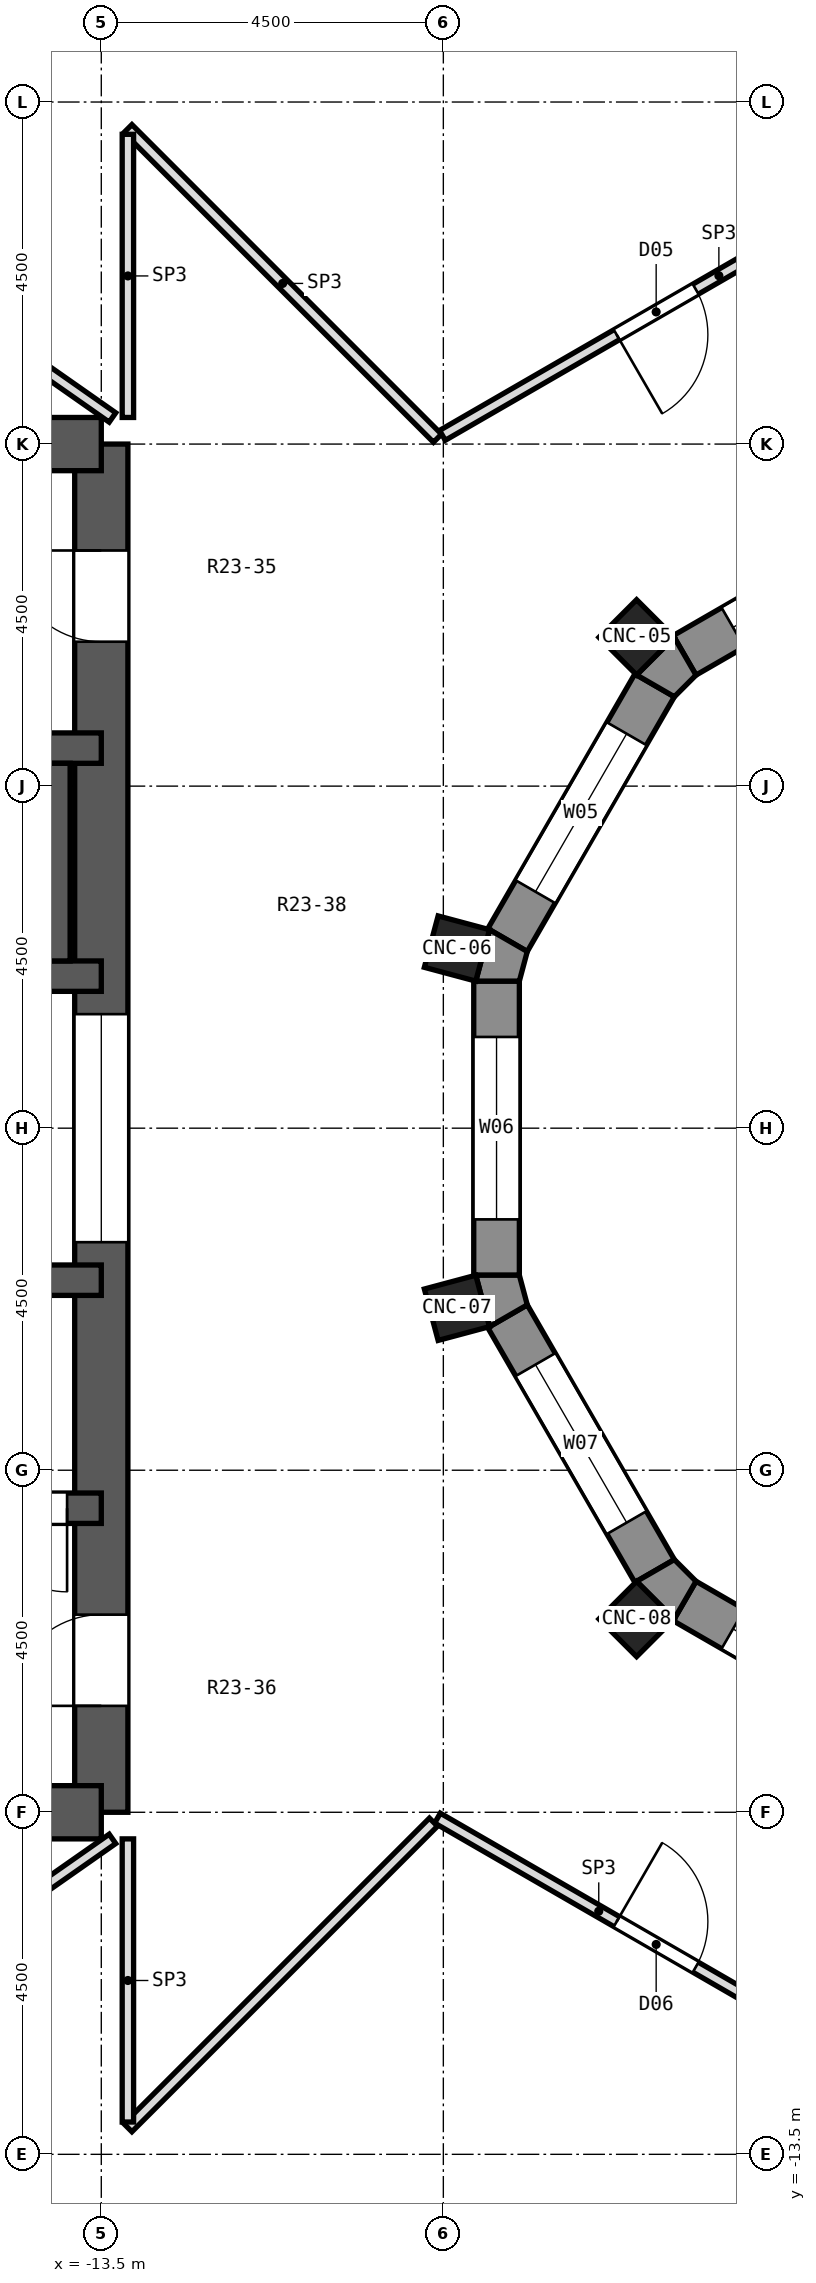
"""IFC4 building model, lengths in metres.
Left out: names, types, materials, properties, quantities, classifications, styles, units other than length and angle.
Written with IfcOpenShell. Run it as: python <this file> out.ifc"""

import sys

from ifc_helpers import new_model, si_unit, direction, frame, frame_2d, origin, origin_2d, place, context, subcontext, project, spatial, polyline, rectangle, outline, extrude, element, fill, save


model = new_model("IFC4")
c1 = context("Model", 3, precision=1e-05, world=origin(), true_north=direction((0.0, 1.0)))
c2 = subcontext(c1, "Body", "Model", "MODEL_VIEW")
j1 = project(units=[si_unit("LENGTHUNIT", "METRE"), si_unit("PLANEANGLEUNIT", "RADIAN")], contexts=[c1])
p1 = place(None, origin())
s1 = spatial("IfcSite", under=j1, at=p1, CompositionType="ELEMENT")
p2 = place(p1, origin())
s2 = spatial("IfcBuilding", under=s1, at=p2, CompositionType="ELEMENT")
p3 = place(p2, frame((0.0, 0.0, 151.3)))
s3 = spatial("IfcBuildingStorey", under=s2, at=p3, CompositionType="ELEMENT", Elevation=151.3)
for number, where, z_axis, x_axis in (
    (1, (-6.458, 6.458, 0.0), (0.0, 0.0, 1.0), (-0.707, 0.707, 0.0)),
    (2, (-8.821, 2.364, 0.0), (0.0, 0.0, 1.0), (-0.966, 0.259, 0.0)),
    (3, (-8.821, -2.364, 0.0), (0.0, 0.0, 1.0), (-0.966, -0.259, 0.0)),
    (4, (-6.458, -6.458, 0.0), (0.0, 0.0, 1.0), (-0.707, -0.707, 0.0)),
):
    element("IfcColumn", number, at=place(p3, frame(where, z_axis=z_axis, x_axis=x_axis)), inside=s3, PredefinedType="COLUMN", context=c2, shape_type="SweptSolid", body=[
        extrude(rectangle(XDim=0.7, YDim=0.7, at=origin_2d()), origin(), (0.0, 0.0, 1.0), 4.5),
    ])
p4 = place(p3, frame((-13.5, -9.0, 0.0), z_axis=(0.0, 0.0, 1.0), x_axis=(0.0, 1.0, 0.0)))
e5 = element("IfcWall", 5, at=p4, inside=s3, PredefinedType="SHEAR", context=c2, shape_type="SweptSolid", body=[
    extrude(rectangle(XDim=18.0, YDim=0.7, at=frame_2d((9.0, 0.0))), origin(), (0.0, 0.0, 1.0), 4.5),
])
p5 = place(p4, frame((15.4, 0.0, 0.0)))
e6 = element("IfcOpeningElement", 6, at=p5, cuts=e5, PredefinedType="OPENING", context=c2, shape_type="SweptSolid", body=[
    extrude(rectangle(XDim=1.2, YDim=2.1, at=frame_2d((0.6, 1.05))), frame((0.0, 0.362, 0.0), z_axis=(0.0, -1.0, 0.0), x_axis=(1.0, 0.0, 0.0)), (0.0, 0.0, 1.0), 0.724),
])
p6 = place(p4, frame((1.4, 0.0, 0.0)))
e7 = element("IfcOpeningElement", 7, at=p6, cuts=e5, PredefinedType="OPENING", context=c2, shape_type="SweptSolid", body=[
    extrude(rectangle(XDim=1.2, YDim=2.1, at=frame_2d((0.6, 1.05))), frame((0.0, 0.362, 0.0), z_axis=(0.0, -1.0, 0.0), x_axis=(1.0, 0.0, 0.0)), (0.0, 0.0, 1.0), 0.724),
])
p7 = place(p4, frame((7.5, 0.0, 0.0)))
e8 = element("IfcOpeningElement", 8, at=p7, cuts=e5, PredefinedType="OPENING", context=c2, shape_type="SweptSolid", body=[
    extrude(rectangle(XDim=3.0, YDim=2.4, at=frame_2d((1.5, 1.2))), frame((0.0, 0.362, 0.0), z_axis=(0.0, -1.0, 0.0), x_axis=(1.0, 0.0, 0.0)), (0.0, 0.0, 1.0), 0.724),
])
for number, where, z_axis, x_axis in (
    (9, (-13.5, 9.0, 0.0), (0.0, 0.0, 1.0), (-1.0, 0.0, 0.0)),
    (10, (-13.5, -9.0, 0.0), (0.0, 0.0, 1.0), (-1.0, 0.0, 0.0)),
):
    element("IfcWall", number, at=place(p3, frame(where, z_axis=z_axis, x_axis=x_axis)), inside=s3, PredefinedType="SHEAR", context=c2, shape_type="SweptSolid", body=[
        extrude(rectangle(XDim=8.0, YDim=0.7, at=frame_2d((4.0, 0.0))), origin(), (0.0, 0.0, 1.0), 4.5),
    ])
p8 = place(p3, frame((-13.5, 5.0, 0.0), z_axis=(0.0, 0.0, 1.0), x_axis=(-1.0, 0.0, 0.0)))
e11 = element("IfcWall", 11, at=p8, inside=s3, PredefinedType="SHEAR", context=c2, shape_type="SweptSolid", body=[
    extrude(rectangle(XDim=8.0, YDim=0.4, at=frame_2d((4.0, 0.0))), origin(), (0.0, 0.0, 1.0), 4.5),
])
p9 = place(p3, frame((-13.5, -5.0, 0.0), z_axis=(0.0, 0.0, 1.0), x_axis=(-1.0, 0.0, 0.0)))
e12 = element("IfcWall", 12, at=p9, inside=s3, PredefinedType="SHEAR", context=c2, shape_type="SweptSolid", body=[
    extrude(rectangle(XDim=8.0, YDim=0.4, at=frame_2d((4.0, 0.0))), origin(), (0.0, 0.0, 1.0), 4.5),
])
p10 = place(p9, frame((0.45, 0.0, 0.0)))
e13 = element("IfcOpeningElement", 13, at=p10, cuts=e12, PredefinedType="OPENING", context=c2, shape_type="SweptSolid", body=[
    extrude(rectangle(XDim=1.1, YDim=2.1, at=frame_2d((0.55, 1.05))), frame((0.0, 0.212, 0.0), z_axis=(0.0, -1.0, 0.0), x_axis=(1.0, 0.0, 0.0)), (0.0, 0.0, 1.0), 0.424),
])
p11 = place(p3, frame((-13.5, 2.0, 0.0), z_axis=(0.0, 0.0, 1.0), x_axis=(-1.0, 0.0, 0.0)))
e14 = element("IfcWall", 14, at=p11, inside=s3, PredefinedType="SHEAR", context=c2, shape_type="SweptSolid", body=[
    extrude(rectangle(XDim=8.0, YDim=0.4, at=frame_2d((4.0, 0.0))), origin(), (0.0, 0.0, 1.0), 4.5),
])
p12 = place(p11, frame((5.37, 0.0, 0.0)))
e15 = element("IfcOpeningElement", 15, at=p12, cuts=e14, PredefinedType="OPENING", context=c2, shape_type="SweptSolid", body=[
    extrude(rectangle(XDim=1.1, YDim=2.1, at=frame_2d((0.55, 1.05))), frame((0.0, 0.212, 0.0), z_axis=(0.0, -1.0, 0.0), x_axis=(1.0, 0.0, 0.0)), (0.0, 0.0, 1.0), 0.424),
])
p13 = place(p3, frame((-13.5, -2.0, 0.0), z_axis=(0.0, 0.0, 1.0), x_axis=(-1.0, 0.0, 0.0)))
e16 = element("IfcWall", 16, at=p13, inside=s3, PredefinedType="SHEAR", context=c2, shape_type="SweptSolid", body=[
    extrude(rectangle(XDim=8.0, YDim=0.4, at=frame_2d((4.0, 0.0))), origin(), (0.0, 0.0, 1.0), 4.5),
])
p14 = place(p13, frame((1.19, 0.0, 0.0)))
e17 = element("IfcOpeningElement", 17, at=p14, cuts=e16, PredefinedType="OPENING", context=c2, shape_type="SweptSolid", body=[
    extrude(rectangle(XDim=1.0, YDim=2.1, at=frame_2d((0.5, 1.05))), frame((0.0, 0.212, 0.0), z_axis=(0.0, -1.0, 0.0), x_axis=(1.0, 0.0, 0.0)), (0.0, 0.0, 1.0), 0.424),
])
p15 = place(p13, frame((5.445, 0.0, 0.0)))
e18 = element("IfcOpeningElement", 18, at=p15, cuts=e16, PredefinedType="OPENING", context=c2, shape_type="SweptSolid", body=[
    extrude(rectangle(XDim=0.9, YDim=2.1, at=frame_2d((0.45, 1.05))), frame((0.0, 0.212, 0.0), z_axis=(0.0, -1.0, 0.0), x_axis=(1.0, 0.0, 0.0)), (0.0, 0.0, 1.0), 0.424),
])
p16 = place(p13, frame((6.615, 0.0, 0.0)))
e19 = element("IfcOpeningElement", 19, at=p16, cuts=e16, PredefinedType="OPENING", context=c2, shape_type="SweptSolid", body=[
    extrude(rectangle(XDim=0.9, YDim=2.1, at=frame_2d((0.45, 1.05))), frame((0.0, 0.212, 0.0), z_axis=(0.0, -1.0, 0.0), x_axis=(1.0, 0.0, 0.0)), (0.0, 0.0, 1.0), 0.424),
])
p17 = place(p3, frame((-2.474, 8.156, 0.0), z_axis=(0.0, 0.0, 1.0), x_axis=(-0.866005929495, -0.500033728941, 0.0)))
e20 = element("IfcWall", 20, at=p17, inside=s3, PredefinedType="SOLIDWALL", context=c2, shape_type="SweptSolid", body=[
    extrude(rectangle(XDim=3.87, YDim=0.6, at=frame_2d((1.935, 0.0))), origin(), (0.0, 0.0, 1.0), 3.95),
])
p18 = place(p17, frame((0.735, 0.0, 1.5)))
e21 = element("IfcOpeningElement", 21, at=p18, cuts=e20, PredefinedType="OPENING", context=c2, shape_type="SweptSolid", body=[
    extrude(rectangle(XDim=2.4, YDim=2.0, at=frame_2d((1.2, 1.0))), frame((0.0, 0.312, 0.0), z_axis=(0.0, -1.0, 0.0), x_axis=(1.0, 0.0, 0.0)), (0.0, 0.0, 1.0), 0.624),
])
p19 = place(p3, frame((-6.22, 5.826, 0.0), z_axis=(0.0, 0.0, 1.0), x_axis=(-0.500033728941, -0.866005929495, 0.0)))
e22 = element("IfcWall", 22, at=p19, inside=s3, PredefinedType="SOLIDWALL", context=c2, shape_type="SweptSolid", body=[
    extrude(rectangle(XDim=3.87, YDim=0.6, at=frame_2d((1.935, 0.0))), origin(), (0.0, 0.0, 1.0), 3.95),
])
p20 = place(p19, frame((0.735, 0.0, 1.5)))
e23 = element("IfcOpeningElement", 23, at=p20, cuts=e22, PredefinedType="OPENING", context=c2, shape_type="SweptSolid", body=[
    extrude(rectangle(XDim=2.4, YDim=2.0, at=frame_2d((1.2, 1.0))), frame((0.0, 0.312, 0.0), z_axis=(0.0, -1.0, 0.0), x_axis=(1.0, 0.0, 0.0)), (0.0, 0.0, 1.0), 0.624),
])
p21 = place(p3, frame((-8.3, 1.935, 0.0), z_axis=(0.0, 0.0, 1.0), x_axis=(0.0, -1.0, 0.0)))
e24 = element("IfcWall", 24, at=p21, inside=s3, PredefinedType="SOLIDWALL", context=c2, shape_type="SweptSolid", body=[
    extrude(rectangle(XDim=3.87, YDim=0.6, at=frame_2d((1.935, 0.0))), origin(), (0.0, 0.0, 1.0), 3.95),
])
p22 = place(p21, frame((0.735, 0.0, 1.5)))
e25 = element("IfcOpeningElement", 25, at=p22, cuts=e24, PredefinedType="OPENING", context=c2, shape_type="SweptSolid", body=[
    extrude(rectangle(XDim=2.4, YDim=2.0, at=frame_2d((1.2, 1.0))), frame((0.0, 0.312, 0.0), z_axis=(0.0, -1.0, 0.0), x_axis=(1.0, 0.0, 0.0)), (0.0, 0.0, 1.0), 0.624),
])
p23 = place(p3, frame((-8.156, -2.474, 0.0), z_axis=(0.0, 0.0, 1.0), x_axis=(0.500033728941, -0.866005929495, 0.0)))
e26 = element("IfcWall", 26, at=p23, inside=s3, PredefinedType="SOLIDWALL", context=c2, shape_type="SweptSolid", body=[
    extrude(rectangle(XDim=3.87, YDim=0.6, at=frame_2d((1.935, 0.0))), origin(), (0.0, 0.0, 1.0), 3.95),
])
p24 = place(p23, frame((0.735, 0.0, 1.5)))
e27 = element("IfcOpeningElement", 27, at=p24, cuts=e26, PredefinedType="OPENING", context=c2, shape_type="SweptSolid", body=[
    extrude(rectangle(XDim=2.4, YDim=2.0, at=frame_2d((1.2, 1.0))), frame((0.0, 0.312, 0.0), z_axis=(0.0, -1.0, 0.0), x_axis=(1.0, 0.0, 0.0)), (0.0, 0.0, 1.0), 0.624),
])
p25 = place(p3, frame((-5.826, -6.22, 0.0), z_axis=(0.0, 0.0, 1.0), x_axis=(0.866005929495, -0.500033728941, 0.0)))
e28 = element("IfcWall", 28, at=p25, inside=s3, PredefinedType="SOLIDWALL", context=c2, shape_type="SweptSolid", body=[
    extrude(rectangle(XDim=3.87, YDim=0.6, at=frame_2d((1.935, 0.0))), origin(), (0.0, 0.0, 1.0), 3.95),
])
p26 = place(p25, frame((0.735, 0.0, 1.5)))
e29 = element("IfcOpeningElement", 29, at=p26, cuts=e28, PredefinedType="OPENING", context=c2, shape_type="SweptSolid", body=[
    extrude(rectangle(XDim=2.4, YDim=2.0, at=frame_2d((1.2, 1.0))), frame((0.0, 0.312, 0.0), z_axis=(0.0, -1.0, 0.0), x_axis=(1.0, 0.0, 0.0)), (0.0, 0.0, 1.0), 0.624),
])
p27 = place(p3, origin())
e30 = element("IfcWall", 30, at=p27, inside=s3, PredefinedType="SOLIDWALL", context=c2, shape_type="SweptSolid", body=[
    extrude(outline(polyline([(-6.458, 5.962), (-5.961, 5.676), (-5.676, 5.961), (-5.962, 6.458), (-6.458, 5.962)])), origin(), (0.0, 0.0, 1.0), 3.95),
])
p28 = place(p3, origin())
e31 = element("IfcWall", 31, at=p28, inside=s3, PredefinedType="SOLIDWALL", context=c2, shape_type="SweptSolid", body=[
    extrude(outline(polyline([(-8.573, 1.935), (-8.0, 1.935), (-7.896, 2.324), (-8.392, 2.611), (-8.573, 1.935)])), origin(), (0.0, 0.0, 1.0), 3.95),
])
p29 = place(p3, origin())
e32 = element("IfcWall", 32, at=p29, inside=s3, PredefinedType="SOLIDWALL", context=c2, shape_type="SweptSolid", body=[
    extrude(outline(polyline([(-8.0, -1.935), (-8.573, -1.935), (-8.392, -2.611), (-7.896, -2.324), (-8.0, -1.935)])), origin(), (0.0, 0.0, 1.0), 3.95),
])
p30 = place(p3, origin())
e33 = element("IfcWall", 33, at=p30, inside=s3, PredefinedType="SOLIDWALL", context=c2, shape_type="SweptSolid", body=[
    extrude(outline(polyline([(-6.458, -5.962), (-5.962, -6.458), (-5.676, -5.961), (-5.961, -5.676), (-6.458, -5.962)])), origin(), (0.0, 0.0, 1.0), 3.95),
])
p31 = place(p3, frame((-6.134, 22.892, 0.0), z_axis=(0.0, 0.0, 1.0), x_axis=(0.258769040429, -0.965939223614, 0.0)))
e34 = element("IfcWall", 34, at=p31, inside=s3, PredefinedType="PARTITIONING", context=c2, shape_type="SweptSolid", body=[
    extrude(rectangle(XDim=10.862, YDim=0.15, at=frame_2d((5.431, 0.0))), origin(), (0.0, 0.0, 1.0), 3.95),
])
p32 = place(p3, frame((-13.15, 13.15, 0.0), z_axis=(0.0, 0.0, 1.0), x_axis=(0.707106781187, -0.707106781187, 0.0)))
e35 = element("IfcWall", 35, at=p32, inside=s3, PredefinedType="PARTITIONING", context=c2, shape_type="SweptSolid", body=[
    extrude(rectangle(XDim=5.76, YDim=0.15, at=frame_2d((2.88, 0.0))), origin(), (0.0, 0.0, 1.0), 3.95),
])
p33 = place(p3, frame((-19.414, 13.594, 0.0), z_axis=(0.0, 0.0, 1.0), x_axis=(0.819157506644, -0.573568635221, 0.0)))
e36 = element("IfcWall", 36, at=p33, inside=s3, PredefinedType="PARTITIONING", context=c2, shape_type="SweptSolid", body=[
    extrude(rectangle(XDim=7.399, YDim=0.15, at=frame_2d((3.7, 0.0))), origin(), (0.0, 0.0, 1.0), 3.95),
])
p34 = place(p3, frame((-9.077, -9.077, 0.0), z_axis=(0.0, 0.0, 1.0), x_axis=(0.865961614908, -0.500110469302, 0.0)))
e37 = element("IfcWall", 37, at=p34, inside=s3, PredefinedType="PARTITIONING", context=c2, shape_type="SweptSolid", body=[
    extrude(rectangle(XDim=6.645, YDim=0.15, at=frame_2d((3.322, 0.0))), origin(), (0.0, 0.0, 1.0), 3.95),
])
p35 = place(p34, frame((2.722, 0.0, 0.0)))
e38 = element("IfcOpeningElement", 38, at=p35, cuts=e37, PredefinedType="OPENING", context=c2, shape_type="SweptSolid", body=[
    extrude(rectangle(XDim=1.2, YDim=2.1, at=frame_2d((0.6, 1.05))), frame((0.0, 0.087, 0.0), z_axis=(0.0, -1.0, 0.0), x_axis=(1.0, 0.0, 0.0)), (0.0, 0.0, 1.0), 0.174),
])
p36 = place(p3, frame((-9.012, 9.115, 0.0), z_axis=(0.0, 0.0, 1.0), x_axis=(0.865967095912, 0.5001009786, 0.0)))
e39 = element("IfcWall", 39, at=p36, inside=s3, PredefinedType="PARTITIONING", context=c2, shape_type="SweptSolid", body=[
    extrude(rectangle(XDim=6.495, YDim=0.15, at=frame_2d((3.248, 0.0))), origin(), (0.0, 0.0, 1.0), 3.95),
])
p37 = place(p36, frame((2.647, 0.0, 0.0)))
e40 = element("IfcOpeningElement", 40, at=p37, cuts=e39, PredefinedType="OPENING", context=c2, shape_type="SweptSolid", body=[
    extrude(rectangle(XDim=1.2, YDim=2.1, at=frame_2d((0.6, 1.05))), frame((0.0, 0.087, 0.0), z_axis=(0.0, -1.0, 0.0), x_axis=(1.0, 0.0, 0.0)), (0.0, 0.0, 1.0), 0.174),
])
p38 = place(p3, frame((-19.414, -13.594, 0.0), z_axis=(0.0, 0.0, 1.0), x_axis=(0.819157506644, 0.573568635221, 0.0)))
e41 = element("IfcWall", 41, at=p38, inside=s3, PredefinedType="PARTITIONING", context=c2, shape_type="SweptSolid", body=[
    extrude(rectangle(XDim=7.399, YDim=0.15, at=frame_2d((3.7, 0.0))), origin(), (0.0, 0.0, 1.0), 3.95),
])
p39 = place(p3, frame((-13.15, -13.15, 0.0), z_axis=(0.0, 0.0, 1.0), x_axis=(0.707106781187, 0.707106781187, 0.0)))
e42 = element("IfcWall", 42, at=p39, inside=s3, PredefinedType="PARTITIONING", context=c2, shape_type="SweptSolid", body=[
    extrude(rectangle(XDim=5.685, YDim=0.15, at=frame_2d((2.843, 0.0))), origin(), (0.0, 0.0, 1.0), 3.95),
])
p40 = place(p3, frame((-6.134, -22.892, 0.0), z_axis=(0.0, 0.0, 1.0), x_axis=(0.258802076295, 0.965930372908, 0.0)))
e43 = element("IfcWall", 43, at=p40, inside=s3, PredefinedType="PARTITIONING", context=c2, shape_type="SweptSolid", body=[
    extrude(rectangle(XDim=10.787, YDim=0.15, at=frame_2d((5.394, 0.0))), origin(), (0.0, 0.0, 1.0), 3.95),
])
for number, where, z_axis, x_axis in (
    (44, (-13.15, -13.075, 0.0), (0.0, 0.0, 1.0), (0.0, 1.0, 0.0)),
    (45, (-13.15, 9.35, 0.0), (0.0, 0.0, 1.0), (0.0, 1.0, 0.0)),
):
    element("IfcWall", number, at=place(p3, frame(where, z_axis=z_axis, x_axis=x_axis)), inside=s3, PredefinedType="PARTITIONING", context=c2, shape_type="SweptSolid", body=[
        extrude(rectangle(XDim=3.725, YDim=0.15, at=frame_2d((1.862, 0.0))), origin(), (0.0, 0.0, 1.0), 3.95),
    ])
p41 = place(p3, frame((-13.91, 3.5, 0.0), z_axis=(0.0, 0.0, 1.0), x_axis=(-1.0, 0.0, 0.0)))
e46 = element("IfcWall", 46, at=p41, inside=s3, PredefinedType="SOLIDWALL", context=c2, shape_type="SweptSolid", body=[
    extrude(rectangle(XDim=2.31, YDim=2.6, at=frame_2d((1.155, 0.0))), origin(), (0.0, 0.0, 1.0), 3.1),
])
p42 = place(p18, origin())
e47 = element("IfcWindow", 47, at=p42, inside=s3, PartitioningType="SINGLE_PANEL", PredefinedType="WINDOW", context=c2, shape_type="SweptSolid", body=[
    extrude(rectangle(XDim=2.4, YDim=2.0, at=frame_2d((1.2, 1.0))), frame((0.0, -0.12, 0.0), z_axis=(0.0, -1.0, 0.0), x_axis=(1.0, 0.0, 0.0)), (0.0, 0.0, 1.0), 0.06),
])
fill(e21, e47)
p43 = place(p20, origin())
e48 = element("IfcWindow", 48, at=p43, inside=s3, PartitioningType="SINGLE_PANEL", PredefinedType="WINDOW", context=c2, shape_type="SweptSolid", body=[
    extrude(rectangle(XDim=2.4, YDim=2.0, at=frame_2d((1.2, 1.0))), frame((0.0, -0.12, 0.0), z_axis=(0.0, -1.0, 0.0), x_axis=(1.0, 0.0, 0.0)), (0.0, 0.0, 1.0), 0.06),
])
fill(e23, e48)
p44 = place(p22, origin())
e49 = element("IfcWindow", 49, at=p44, inside=s3, PartitioningType="SINGLE_PANEL", PredefinedType="WINDOW", context=c2, shape_type="SweptSolid", body=[
    extrude(rectangle(XDim=2.4, YDim=2.0, at=frame_2d((1.2, 1.0))), frame((0.0, -0.12, 0.0), z_axis=(0.0, -1.0, 0.0), x_axis=(1.0, 0.0, 0.0)), (0.0, 0.0, 1.0), 0.06),
])
fill(e25, e49)
p45 = place(p24, origin())
e50 = element("IfcWindow", 50, at=p45, inside=s3, PartitioningType="SINGLE_PANEL", PredefinedType="WINDOW", context=c2, shape_type="SweptSolid", body=[
    extrude(rectangle(XDim=2.4, YDim=2.0, at=frame_2d((1.2, 1.0))), frame((0.0, -0.12, 0.0), z_axis=(0.0, -1.0, 0.0), x_axis=(1.0, 0.0, 0.0)), (0.0, 0.0, 1.0), 0.06),
])
fill(e27, e50)
p46 = place(p26, origin())
e51 = element("IfcWindow", 51, at=p46, inside=s3, PartitioningType="SINGLE_PANEL", PredefinedType="WINDOW", context=c2, shape_type="SweptSolid", body=[
    extrude(rectangle(XDim=2.4, YDim=2.0, at=frame_2d((1.2, 1.0))), frame((0.0, -0.12, 0.0), z_axis=(0.0, -1.0, 0.0), x_axis=(1.0, 0.0, 0.0)), (0.0, 0.0, 1.0), 0.06),
])
fill(e29, e51)
p47 = place(p37, frame((1.2, 0.0, 0.0), z_axis=(0.0, 0.0, 1.0), x_axis=(-1.0, 0.0, 0.0)))
e52 = element("IfcDoor", 52, at=p47, inside=s3, OperationType="SINGLE_SWING_RIGHT", PredefinedType="DOOR", context=c2, shape_type="SweptSolid", body=[
    extrude(rectangle(XDim=1.2, YDim=2.1, at=frame_2d((0.6, 1.05))), frame((0.0, 0.025, 0.0), z_axis=(0.0, -1.0, 0.0), x_axis=(1.0, 0.0, 0.0)), (0.0, 0.0, 1.0), 0.05),
])
fill(e40, e52)
p48 = place(p35, origin())
e53 = element("IfcDoor", 53, at=p48, inside=s3, OperationType="SINGLE_SWING_LEFT", PredefinedType="DOOR", context=c2, shape_type="SweptSolid", body=[
    extrude(rectangle(XDim=1.2, YDim=2.1, at=frame_2d((0.6, 1.05))), frame((0.0, 0.025, 0.0), z_axis=(0.0, -1.0, 0.0), x_axis=(1.0, 0.0, 0.0)), (0.0, 0.0, 1.0), 0.05),
])
fill(e38, e53)
p49 = place(p10, origin())
e54 = element("IfcDoor", 54, at=p49, inside=s3, OperationType="SINGLE_SWING_LEFT", PredefinedType="DOOR", context=c2, shape_type="SweptSolid", body=[
    extrude(rectangle(XDim=1.1, YDim=2.1, at=frame_2d((0.55, 1.05))), frame((0.0, 0.025, 0.0), z_axis=(0.0, -1.0, 0.0), x_axis=(1.0, 0.0, 0.0)), (0.0, 0.0, 1.0), 0.05),
])
fill(e13, e54)
p50 = place(p5, origin())
e55 = element("IfcDoor", 55, at=p50, inside=s3, OperationType="SINGLE_SWING_RIGHT", PredefinedType="DOOR", context=c2, shape_type="SweptSolid", body=[
    extrude(rectangle(XDim=1.2, YDim=2.1, at=frame_2d((0.6, 1.05))), frame((0.0, 0.025, 0.0), z_axis=(0.0, -1.0, 0.0), x_axis=(1.0, 0.0, 0.0)), (0.0, 0.0, 1.0), 0.05),
])
fill(e6, e55)
p51 = place(p6, origin())
e56 = element("IfcDoor", 56, at=p51, inside=s3, OperationType="SINGLE_SWING_LEFT", PredefinedType="DOOR", context=c2, shape_type="SweptSolid", body=[
    extrude(rectangle(XDim=1.2, YDim=2.1, at=frame_2d((0.6, 1.05))), frame((0.0, 0.025, 0.0), z_axis=(0.0, -1.0, 0.0), x_axis=(1.0, 0.0, 0.0)), (0.0, 0.0, 1.0), 0.05),
])
fill(e7, e56)
p52 = place(p7, origin())
e57 = element("IfcDoor", 57, at=p52, inside=s3, OperationType="DOUBLE_DOOR_SLIDING", PredefinedType="DOOR", context=c2, shape_type="SweptSolid", body=[
    extrude(rectangle(XDim=3.0, YDim=2.4, at=frame_2d((1.5, 1.2))), frame((0.0, 0.025, 0.0), z_axis=(0.0, -1.0, 0.0), x_axis=(1.0, 0.0, 0.0)), (0.0, 0.0, 1.0), 0.05),
])
fill(e8, e57)
save(model, sys.argv[1])
